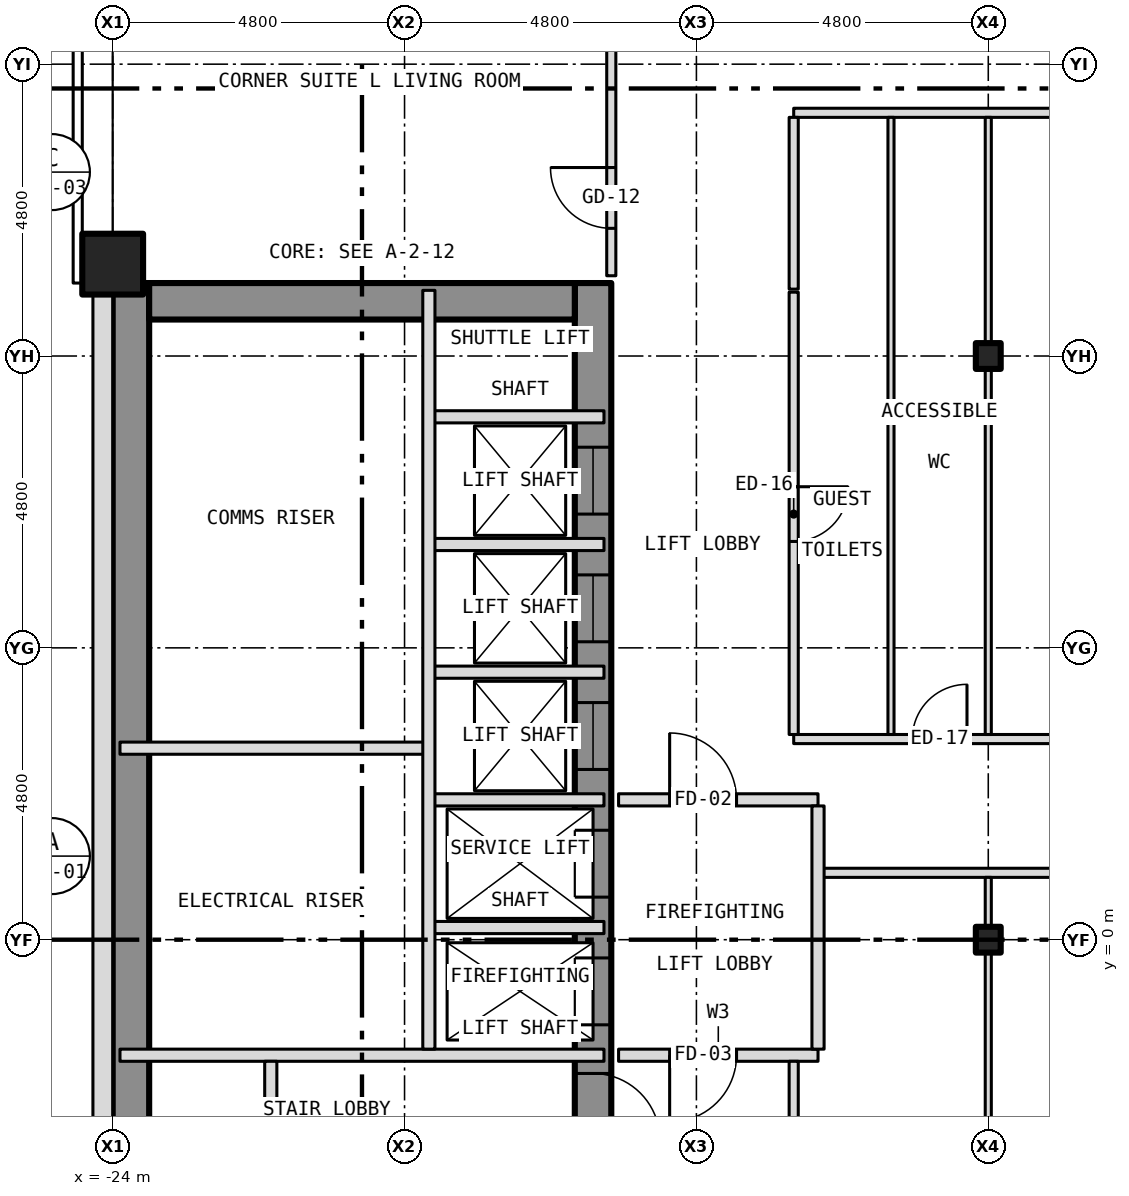
"""IFC4 building model, lengths in metres.
Left out: names, types, materials, properties, quantities, classifications, styles, units other than length and angle.
Written with IfcOpenShell. Run it as: python <this file> out.ifc"""

import sys

from ifc_helpers import new_model, si_unit, direction, frame, frame_2d, origin, origin_2d, place, context, subcontext, project, spatial, rectangle, hollow_rectangle, i_section, extrude, element, fill, save


model = new_model("IFC4")
c1 = context("Model", 3, precision=1e-05, world=origin(), true_north=direction((0.0, 1.0)))
c2 = subcontext(c1, "Body", "Model", "MODEL_VIEW")
j1 = project(units=[si_unit("LENGTHUNIT", "METRE"), si_unit("PLANEANGLEUNIT", "RADIAN")], contexts=[c1])
p1 = place(None, origin())
s1 = spatial("IfcSite", under=j1, at=p1, CompositionType="ELEMENT")
p2 = place(p1, origin())
s2 = spatial("IfcBuilding", under=s1, at=p2, CompositionType="ELEMENT")
p3 = place(p2, frame((0.0, 0.0, 46.0)))
s3 = spatial("IfcBuildingStorey", under=s2, at=p3, CompositionType="ELEMENT", Elevation=46.0)
p4 = place(p3, frame((-24.0, 11.111, -0.15), z_axis=(0.0, 0.0, 1.0), x_axis=(1.0, 0.0, 0.0)))
e1 = element("IfcColumn", 1, at=p4, inside=s3, PredefinedType="COLUMN", context=c2, shape_type="SweptSolid", body=[
    extrude(hollow_rectangle(XDim=1.0, YDim=1.0, WallThickness=0.06, at=origin_2d()), origin(), (0.0, 0.0, 1.0), 3.5),
])
for number, where, z_axis, x_axis in (
    (2, (-9.6, 0.0, -0.15), (0.0, 0.0, 1.0), (1.0, 0.0, 0.0)),
    (3, (-9.6, 9.6, -0.15), (0.0, 0.0, 1.0), (1.0, 0.0, 0.0)),
):
    element("IfcColumn", number, at=place(p3, frame(where, z_axis=z_axis, x_axis=x_axis)), inside=s3, PredefinedType="COLUMN", context=c2, shape_type="SweptSolid", body=[
        extrude(i_section(OverallWidth=0.409, OverallDepth=0.424, WebThickness=0.033, FlangeThickness=0.052, at=origin_2d()), origin(), (0.0, 0.0, 1.0), 3.5),
    ])
p5 = place(p3, frame((-16.1, -10.8, 0.0), z_axis=(0.0, 0.0, 1.0), x_axis=(0.0, 1.0, 0.0)))
e4 = element("IfcWall", 4, at=p5, inside=s3, PredefinedType="SHEAR", context=c2, shape_type="SweptSolid", body=[
    extrude(rectangle(XDim=21.6, YDim=0.6, at=frame_2d((10.8, 0.0))), origin(), (0.0, 0.0, 1.0), 3.25),
])
p6 = place(p5, frame((9.4, 0.0, 0.0)))
e5 = element("IfcOpeningElement", 5, at=p6, cuts=e4, PredefinedType="OPENING", context=c2, shape_type="SweptSolid", body=[
    extrude(rectangle(XDim=1.1, YDim=2.1, at=frame_2d((0.55, 1.05))), frame((0.0, 0.312, 0.0), z_axis=(0.0, -1.0, 0.0), x_axis=(1.0, 0.0, 0.0)), (0.0, 0.0, 1.0), 0.624),
])
p7 = place(p5, frame((11.5, 0.0, 0.0)))
e6 = element("IfcOpeningElement", 6, at=p7, cuts=e4, PredefinedType="OPENING", context=c2, shape_type="SweptSolid", body=[
    extrude(rectangle(XDim=1.1, YDim=2.1, at=frame_2d((0.55, 1.05))), frame((0.0, 0.312, 0.0), z_axis=(0.0, -1.0, 0.0), x_axis=(1.0, 0.0, 0.0)), (0.0, 0.0, 1.0), 0.624),
])
p8 = place(p5, frame((13.6, 0.0, 0.0)))
e7 = element("IfcOpeningElement", 7, at=p8, cuts=e4, PredefinedType="OPENING", context=c2, shape_type="SweptSolid", body=[
    extrude(rectangle(XDim=1.1, YDim=2.1, at=frame_2d((0.55, 1.05))), frame((0.0, 0.312, 0.0), z_axis=(0.0, -1.0, 0.0), x_axis=(1.0, 0.0, 0.0)), (0.0, 0.0, 1.0), 0.624),
])
p9 = place(p5, frame((15.7, 0.0, 0.0)))
e8 = element("IfcOpeningElement", 8, at=p9, cuts=e4, PredefinedType="OPENING", context=c2, shape_type="SweptSolid", body=[
    extrude(rectangle(XDim=1.1, YDim=2.1, at=frame_2d((0.55, 1.05))), frame((0.0, 0.312, 0.0), z_axis=(0.0, -1.0, 0.0), x_axis=(1.0, 0.0, 0.0)), (0.0, 0.0, 1.0), 0.624),
])
p10 = place(p5, frame((17.8, 0.0, 0.0)))
e9 = element("IfcOpeningElement", 9, at=p10, cuts=e4, PredefinedType="OPENING", context=c2, shape_type="SweptSolid", body=[
    extrude(rectangle(XDim=1.1, YDim=2.1, at=frame_2d((0.55, 1.05))), frame((0.0, 0.312, 0.0), z_axis=(0.0, -1.0, 0.0), x_axis=(1.0, 0.0, 0.0)), (0.0, 0.0, 1.0), 0.624),
])
p11 = place(p5, frame((0.758, 0.0, 0.0)))
e10 = element("IfcOpeningElement", 10, at=p11, cuts=e4, PredefinedType="OPENING", context=c2, shape_type="SweptSolid", body=[
    extrude(rectangle(XDim=1.1, YDim=2.1, at=frame_2d((0.55, 1.05))), frame((0.0, 0.312, 0.0), z_axis=(0.0, -1.0, 0.0), x_axis=(1.0, 0.0, 0.0)), (0.0, 0.0, 1.0), 0.624),
])
p12 = place(p5, frame((7.5, 0.0, 0.0)))
e11 = element("IfcOpeningElement", 11, at=p12, cuts=e4, PredefinedType="OPENING", context=c2, shape_type="SweptSolid", body=[
    extrude(rectangle(XDim=1.1, YDim=2.1, at=frame_2d((0.55, 1.05))), frame((0.0, 0.312, 0.0), z_axis=(0.0, -1.0, 0.0), x_axis=(1.0, 0.0, 0.0)), (0.0, 0.0, 1.0), 0.624),
])
p13 = place(p3, frame((-23.7, -10.8, 0.0), z_axis=(0.0, 0.0, 1.0), x_axis=(0.0, 1.0, 0.0)))
e12 = element("IfcWall", 12, at=p13, inside=s3, PredefinedType="SHEAR", context=c2, shape_type="SweptSolid", body=[
    extrude(rectangle(XDim=21.6, YDim=0.6, at=frame_2d((10.8, 0.0))), origin(), (0.0, 0.0, 1.0), 3.25),
])
p14 = place(p3, frame((-23.4, 10.5, 0.0), z_axis=(0.0, 0.0, 1.0), x_axis=(1.0, 0.0, 0.0)))
e13 = element("IfcWall", 13, at=p14, inside=s3, PredefinedType="SHEAR", context=c2, shape_type="SweptSolid", body=[
    extrude(rectangle(XDim=7.0, YDim=0.6, at=frame_2d((3.5, 0.0))), origin(), (0.0, 0.0, 1.0), 3.25),
])
p15 = place(p3, frame((-24.163, 10.8, 0.0), z_axis=(0.0, 0.0, 1.0), x_axis=(0.0, -1.0, 0.0)))
e14 = element("IfcWall", 14, at=p15, inside=s3, PredefinedType="SOLIDWALL", context=c2, shape_type="SweptSolid", body=[
    extrude(rectangle(XDim=21.6, YDim=0.325, at=frame_2d((10.8, 0.0))), origin(), (0.0, 0.0, 1.0), 3.5),
])
p16 = place(p15, frame((18.05, 0.0, 1.0)))
e15 = element("IfcOpeningElement", 15, at=p16, cuts=e14, PredefinedType="OPENING", context=c2, shape_type="SweptSolid", body=[
    extrude(rectangle(XDim=0.6, YDim=1.5, at=frame_2d((0.3, 0.75))), frame((0.0, 0.175, 0.0), z_axis=(0.0, -1.0, 0.0), x_axis=(1.0, 0.0, 0.0)), (0.0, 0.0, 1.0), 0.349),
])
p17 = place(p3, frame((-23.88, -1.9, 0.0), z_axis=(0.0, 0.0, 1.0), x_axis=(1.0, 0.0, 0.0)))
e16 = element("IfcWall", 16, at=p17, inside=s3, PredefinedType="PARTITIONING", context=c2, shape_type="SweptSolid", body=[
    extrude(rectangle(XDim=7.96, YDim=0.2, at=frame_2d((3.98, 0.0))), origin(), (0.0, 0.0, 1.0), 3.25),
])
p18 = place(p3, frame((-15.68, -1.9, 0.0), z_axis=(0.0, 0.0, 1.0), x_axis=(1.0, 0.0, 0.0)))
e17 = element("IfcWall", 17, at=p18, inside=s3, PredefinedType="PARTITIONING", context=c2, shape_type="SweptSolid", body=[
    extrude(rectangle(XDim=3.28, YDim=0.2, at=frame_2d((1.64, 0.0))), origin(), (0.0, 0.0, 1.0), 3.35),
])
p19 = place(p18, frame((0.84, 0.0, 0.0)))
e18 = element("IfcOpeningElement", 18, at=p19, cuts=e17, PredefinedType="OPENING", context=c2, shape_type="SweptSolid", body=[
    extrude(rectangle(XDim=1.1, YDim=2.1, at=frame_2d((0.55, 1.05))), frame((0.0, 0.112, 0.0), z_axis=(0.0, -1.0, 0.0), x_axis=(1.0, 0.0, 0.0)), (0.0, 0.0, 1.0), 0.224),
])
p20 = place(p3, frame((-18.8, 0.2, 0.0), z_axis=(0.0, 0.0, 1.0), x_axis=(1.0, 0.0, 0.0)))
e19 = element("IfcWall", 19, at=p20, inside=s3, PredefinedType="PARTITIONING", context=c2, shape_type="SweptSolid", body=[
    extrude(rectangle(XDim=2.88, YDim=0.2, at=frame_2d((1.44, 0.0))), origin(), (0.0, 0.0, 1.0), 3.25),
])
p21 = place(p3, frame((-12.4, 1.1, 0.0), z_axis=(0.0, 0.0, 1.0), x_axis=(1.0, 0.0, 0.0)))
e20 = element("IfcWall", 20, at=p21, inside=s3, PredefinedType="PARTITIONING", context=c2, shape_type="SweptSolid", body=[
    extrude(rectangle(XDim=24.8, YDim=0.15, at=frame_2d((12.4, 0.0))), origin(), (0.0, 0.0, 1.0), 3.35),
])
p22 = place(p3, frame((-18.8, 2.3, 0.0), z_axis=(0.0, 0.0, 1.0), x_axis=(1.0, 0.0, 0.0)))
e21 = element("IfcWall", 21, at=p22, inside=s3, PredefinedType="PARTITIONING", context=c2, shape_type="SweptSolid", body=[
    extrude(rectangle(XDim=2.88, YDim=0.2, at=frame_2d((1.44, 0.0))), origin(), (0.0, 0.0, 1.0), 3.25),
])
p23 = place(p3, frame((-15.68, 2.3, 0.0), z_axis=(0.0, 0.0, 1.0), x_axis=(1.0, 0.0, 0.0)))
e22 = element("IfcWall", 22, at=p23, inside=s3, PredefinedType="PARTITIONING", context=c2, shape_type="SweptSolid", body=[
    extrude(rectangle(XDim=3.28, YDim=0.2, at=frame_2d((1.64, 0.0))), origin(), (0.0, 0.0, 1.0), 3.35),
])
p24 = place(p23, frame((0.84, 0.0, 0.0)))
e23 = element("IfcOpeningElement", 23, at=p24, cuts=e22, PredefinedType="OPENING", context=c2, shape_type="SweptSolid", body=[
    extrude(rectangle(XDim=1.1, YDim=2.1, at=frame_2d((0.55, 1.05))), frame((0.0, 0.112, 0.0), z_axis=(0.0, -1.0, 0.0), x_axis=(1.0, 0.0, 0.0)), (0.0, 0.0, 1.0), 0.224),
])
p25 = place(p3, frame((-23.88, 3.15, 0.0), z_axis=(0.0, 0.0, 1.0), x_axis=(1.0, 0.0, 0.0)))
e24 = element("IfcWall", 24, at=p25, inside=s3, PredefinedType="PARTITIONING", context=c2, shape_type="SweptSolid", body=[
    extrude(rectangle(XDim=5.08, YDim=0.2, at=frame_2d((2.54, 0.0))), origin(), (0.0, 0.0, 1.0), 3.25),
])
p26 = place(p3, frame((-12.8, 3.3, 0.0), z_axis=(0.0, 0.0, 1.0), x_axis=(1.0, 0.0, 0.0)))
e25 = element("IfcWall", 25, at=p26, inside=s3, PredefinedType="PARTITIONING", context=c2, shape_type="SweptSolid", body=[
    extrude(rectangle(XDim=25.6, YDim=0.15, at=frame_2d((12.8, 0.0))), origin(), (0.0, 0.0, 1.0), 3.35),
])
p27 = place(p26, frame((1.95, 0.0, 0.0)))
e26 = element("IfcOpeningElement", 26, at=p27, cuts=e25, PredefinedType="OPENING", context=c2, shape_type="SweptSolid", body=[
    extrude(rectangle(XDim=0.9, YDim=2.1, at=frame_2d((0.45, 1.05))), frame((0.0, 0.087, 0.0), z_axis=(0.0, -1.0, 0.0), x_axis=(1.0, 0.0, 0.0)), (0.0, 0.0, 1.0), 0.174),
])
for number, where, z_axis, x_axis in (
    (27, (-18.8, 4.4, 0.0), (0.0, 0.0, 1.0), (1.0, 0.0, 0.0)),
    (28, (-18.8, 6.5, 0.0), (0.0, 0.0, 1.0), (1.0, 0.0, 0.0)),
    (29, (-18.8, 8.6, 0.0), (0.0, 0.0, 1.0), (1.0, 0.0, 0.0)),
):
    element("IfcWall", number, at=place(p3, frame(where, z_axis=z_axis, x_axis=x_axis)), inside=s3, PredefinedType="PARTITIONING", context=c2, shape_type="SweptSolid", body=[
        extrude(rectangle(XDim=2.88, YDim=0.2, at=frame_2d((1.44, 0.0))), origin(), (0.0, 0.0, 1.0), 3.25),
    ])
p28 = place(p3, frame((-12.8, 13.6, 0.0), z_axis=(0.0, 0.0, 1.0), x_axis=(1.0, 0.0, 0.0)))
e30 = element("IfcWall", 30, at=p28, inside=s3, PredefinedType="PARTITIONING", context=c2, shape_type="SweptSolid", body=[
    extrude(rectangle(XDim=25.6, YDim=0.15, at=frame_2d((12.8, 0.0))), origin(), (0.0, 0.0, 1.0), 3.35),
])
p29 = place(p28, frame((12.35, 0.0, 0.0)))
e31 = element("IfcOpeningElement", 31, at=p29, cuts=e30, PredefinedType="OPENING", context=c2, shape_type="SweptSolid", body=[
    extrude(rectangle(XDim=0.9, YDim=2.1, at=frame_2d((0.45, 1.05))), frame((0.0, 0.087, 0.0), z_axis=(0.0, -1.0, 0.0), x_axis=(1.0, 0.0, 0.0)), (0.0, 0.0, 1.0), 0.174),
])
p30 = place(p3, frame((-21.4, -10.68, 0.0), z_axis=(0.0, 0.0, 1.0), x_axis=(0.0, 1.0, 0.0)))
e32 = element("IfcWall", 32, at=p30, inside=s3, PredefinedType="PARTITIONING", context=c2, shape_type="SweptSolid", body=[
    extrude(rectangle(XDim=8.68, YDim=0.2, at=frame_2d((4.34, 0.0))), origin(), (0.0, 0.0, 1.0), 3.25),
])
p31 = place(p30, frame((0.899, 0.0, 0.0)))
e33 = element("IfcOpeningElement", 33, at=p31, cuts=e32, PredefinedType="OPENING", context=c2, shape_type="SweptSolid", body=[
    extrude(rectangle(XDim=0.9, YDim=2.1, at=frame_2d((0.45, 1.05))), frame((0.0, 0.112, 0.0), z_axis=(0.0, -1.0, 0.0), x_axis=(1.0, 0.0, 0.0)), (0.0, 0.0, 1.0), 0.224),
])
p32 = place(p30, frame((5.349, 0.0, 0.0)))
e34 = element("IfcOpeningElement", 34, at=p32, cuts=e32, PredefinedType="OPENING", context=c2, shape_type="SweptSolid", body=[
    extrude(rectangle(XDim=0.9, YDim=2.1, at=frame_2d((0.45, 1.05))), frame((0.0, 0.112, 0.0), z_axis=(0.0, -1.0, 0.0), x_axis=(1.0, 0.0, 0.0)), (0.0, 0.0, 1.0), 0.224),
])
p33 = place(p3, frame((-18.8, -1.8, 0.0), z_axis=(0.0, 0.0, 1.0), x_axis=(0.0, 1.0, 0.0)))
e35 = element("IfcWall", 35, at=p33, inside=s3, PredefinedType="PARTITIONING", context=c2, shape_type="SweptSolid", body=[
    extrude(rectangle(XDim=12.48, YDim=0.2, at=frame_2d((6.24, 0.0))), origin(), (0.0, 0.0, 1.0), 3.25),
])
p34 = place(p3, frame((-15.8, 10.92, 0.0), z_axis=(0.0, 0.0, 1.0), x_axis=(0.0, 1.0, 0.0)))
e36 = element("IfcWall", 36, at=p34, inside=s3, PredefinedType="PARTITIONING", context=c2, shape_type="SweptSolid", body=[
    extrude(rectangle(XDim=4.805, YDim=0.15, at=frame_2d((2.403, 0.0))), origin(), (0.0, 0.0, 1.0), 3.35),
])
p35 = place(p34, frame((0.78, 0.0, 0.0)))
e37 = element("IfcOpeningElement", 37, at=p35, cuts=e36, PredefinedType="OPENING", context=c2, shape_type="SweptSolid", body=[
    extrude(rectangle(XDim=1.0, YDim=2.1, at=frame_2d((0.5, 1.05))), frame((0.0, 0.087, 0.0), z_axis=(0.0, -1.0, 0.0), x_axis=(1.0, 0.0, 0.0)), (0.0, 0.0, 1.0), 0.174),
])
p36 = place(p3, frame((-12.8, -13.525, 0.0), z_axis=(0.0, 0.0, 1.0), x_axis=(0.0, 1.0, 0.0)))
e38 = element("IfcWall", 38, at=p36, inside=s3, PredefinedType="PARTITIONING", context=c2, shape_type="SweptSolid", body=[
    extrude(rectangle(XDim=11.525, YDim=0.15, at=frame_2d((5.762, 0.0))), origin(), (0.0, 0.0, 1.0), 3.35),
])
p37 = place(p36, frame((6.725, 0.0, 0.0)))
e39 = element("IfcOpeningElement", 39, at=p37, cuts=e38, PredefinedType="OPENING", context=c2, shape_type="SweptSolid", body=[
    extrude(rectangle(XDim=0.9, YDim=2.1, at=frame_2d((0.45, 1.05))), frame((0.0, 0.087, 0.0), z_axis=(0.0, -1.0, 0.0), x_axis=(1.0, 0.0, 0.0)), (0.0, 0.0, 1.0), 0.174),
])
p38 = place(p3, frame((-12.8, 3.375, 0.0), z_axis=(0.0, 0.0, 1.0), x_axis=(0.0, 1.0, 0.0)))
e40 = element("IfcWall", 40, at=p38, inside=s3, PredefinedType="PARTITIONING", context=c2, shape_type="SweptSolid", body=[
    extrude(rectangle(XDim=7.275, YDim=0.15, at=frame_2d((3.637, 0.0))), origin(), (0.0, 0.0, 1.0), 3.35),
])
p39 = place(p38, frame((3.175, 0.0, 0.0)))
e41 = element("IfcOpeningElement", 41, at=p39, cuts=e40, PredefinedType="OPENING", context=c2, shape_type="SweptSolid", body=[
    extrude(rectangle(XDim=0.9, YDim=2.1, at=frame_2d((0.45, 1.05))), frame((0.0, 0.087, 0.0), z_axis=(0.0, -1.0, 0.0), x_axis=(1.0, 0.0, 0.0)), (0.0, 0.0, 1.0), 0.174),
])
p40 = place(p3, frame((-12.8, 10.7, 0.0), z_axis=(0.0, 0.0, 1.0), x_axis=(0.0, 1.0, 0.0)))
e42 = element("IfcWall", 42, at=p40, inside=s3, PredefinedType="PARTITIONING", context=c2, shape_type="SweptSolid", body=[
    extrude(rectangle(XDim=2.825, YDim=0.15, at=frame_2d((1.413, 0.0))), origin(), (0.0, 0.0, 1.0), 3.35),
])
p41 = place(p3, frame((-12.4, -1.8, 0.0), z_axis=(0.0, 0.0, 1.0), x_axis=(0.0, 1.0, 0.0)))
e43 = element("IfcWall", 43, at=p41, inside=s3, PredefinedType="PARTITIONING", context=c2, shape_type="SweptSolid", body=[
    extrude(rectangle(XDim=4.0, YDim=0.2, at=frame_2d((2.0, 0.0))), origin(), (0.0, 0.0, 1.0), 3.35),
])
p42 = place(p3, frame((-11.2, 3.375, 0.0), z_axis=(0.0, 0.0, 1.0), x_axis=(0.0, 1.0, 0.0)))
e44 = element("IfcWall", 44, at=p42, inside=s3, PredefinedType="PARTITIONING", context=c2, shape_type="SweptSolid", body=[
    extrude(rectangle(XDim=10.15, YDim=0.1, at=frame_2d((5.075, 0.0))), origin(), (0.0, 0.0, 1.0), 3.35),
])
p43 = place(p3, frame((-9.6, -9.396, 0.0), z_axis=(0.0, 0.0, 1.0), x_axis=(0.0, 1.0, 0.0)))
e45 = element("IfcWall", 45, at=p43, inside=s3, PredefinedType="PARTITIONING", context=c2, shape_type="SweptSolid", body=[
    extrude(rectangle(XDim=9.192, YDim=0.1, at=frame_2d((4.596, 0.0))), origin(), (0.0, 0.0, 1.0), 2.728),
])
p44 = place(p3, frame((-9.6, -0.204, 0.0), z_axis=(0.0, 0.0, 1.0), x_axis=(0.0, 1.0, 0.0)))
e46 = element("IfcWall", 46, at=p44, inside=s3, PredefinedType="PARTITIONING", context=c2, shape_type="SweptSolid", body=[
    extrude(rectangle(XDim=0.408, YDim=0.1, at=frame_2d((0.204, 0.0))), origin(), (0.0, 0.0, 1.0), 3.35),
])
p45 = place(p3, frame((-9.6, 0.204, 0.0), z_axis=(0.0, 0.0, 1.0), x_axis=(0.0, 1.0, 0.0)))
e47 = element("IfcWall", 47, at=p45, inside=s3, PredefinedType="PARTITIONING", context=c2, shape_type="SweptSolid", body=[
    extrude(rectangle(XDim=0.821, YDim=0.1, at=frame_2d((0.41, 0.0))), origin(), (0.0, 0.0, 1.0), 2.728),
])
p46 = place(p3, frame((-9.6, 3.375, 0.0), z_axis=(0.0, 0.0, 1.0), x_axis=(0.0, 1.0, 0.0)))
e48 = element("IfcWall", 48, at=p46, inside=s3, PredefinedType="PARTITIONING", context=c2, shape_type="SweptSolid", body=[
    extrude(rectangle(XDim=6.021, YDim=0.1, at=frame_2d((3.01, 0.0))), origin(), (0.0, 0.0, 1.0), 2.728),
])
p47 = place(p3, frame((-9.6, 9.396, 0.0), z_axis=(0.0, 0.0, 1.0), x_axis=(0.0, 1.0, 0.0)))
e49 = element("IfcWall", 49, at=p47, inside=s3, PredefinedType="PARTITIONING", context=c2, shape_type="SweptSolid", body=[
    extrude(rectangle(XDim=0.408, YDim=0.1, at=frame_2d((0.204, 0.0))), origin(), (0.0, 0.0, 1.0), 3.35),
])
p48 = place(p3, frame((-9.6, 9.804, 0.0), z_axis=(0.0, 0.0, 1.0), x_axis=(0.0, 1.0, 0.0)))
e50 = element("IfcWall", 50, at=p48, inside=s3, PredefinedType="PARTITIONING", context=c2, shape_type="SweptSolid", body=[
    extrude(rectangle(XDim=3.721, YDim=0.1, at=frame_2d((1.86, 0.0))), origin(), (0.0, 0.0, 1.0), 2.728),
])
p49 = place(p6, origin())
e51 = element("IfcDoor", 51, at=p49, inside=s3, OperationType="SLIDING_TO_LEFT", PredefinedType="DOOR", context=c2, shape_type="SweptSolid", body=[
    extrude(rectangle(XDim=1.1, YDim=2.1, at=frame_2d((0.55, 1.05))), frame((0.0, 0.025, 0.0), z_axis=(0.0, -1.0, 0.0), x_axis=(1.0, 0.0, 0.0)), (0.0, 0.0, 1.0), 0.05),
])
fill(e5, e51)
p50 = place(p7, origin())
e52 = element("IfcDoor", 52, at=p50, inside=s3, OperationType="SLIDING_TO_LEFT", PredefinedType="DOOR", context=c2, shape_type="SweptSolid", body=[
    extrude(rectangle(XDim=1.1, YDim=2.1, at=frame_2d((0.55, 1.05))), frame((0.0, 0.025, 0.0), z_axis=(0.0, -1.0, 0.0), x_axis=(1.0, 0.0, 0.0)), (0.0, 0.0, 1.0), 0.05),
])
fill(e6, e52)
p51 = place(p8, origin())
e53 = element("IfcDoor", 53, at=p51, inside=s3, OperationType="SLIDING_TO_LEFT", PredefinedType="DOOR", context=c2, shape_type="SweptSolid", body=[
    extrude(rectangle(XDim=1.1, YDim=2.1, at=frame_2d((0.55, 1.05))), frame((0.0, 0.025, 0.0), z_axis=(0.0, -1.0, 0.0), x_axis=(1.0, 0.0, 0.0)), (0.0, 0.0, 1.0), 0.05),
])
fill(e7, e53)
p52 = place(p9, origin())
e54 = element("IfcDoor", 54, at=p52, inside=s3, OperationType="SLIDING_TO_LEFT", PredefinedType="DOOR", context=c2, shape_type="SweptSolid", body=[
    extrude(rectangle(XDim=1.1, YDim=2.1, at=frame_2d((0.55, 1.05))), frame((0.0, 0.025, 0.0), z_axis=(0.0, -1.0, 0.0), x_axis=(1.0, 0.0, 0.0)), (0.0, 0.0, 1.0), 0.05),
])
fill(e8, e54)
p53 = place(p10, origin())
e55 = element("IfcDoor", 55, at=p53, inside=s3, OperationType="SLIDING_TO_LEFT", PredefinedType="DOOR", context=c2, shape_type="SweptSolid", body=[
    extrude(rectangle(XDim=1.1, YDim=2.1, at=frame_2d((0.55, 1.05))), frame((0.0, 0.025, 0.0), z_axis=(0.0, -1.0, 0.0), x_axis=(1.0, 0.0, 0.0)), (0.0, 0.0, 1.0), 0.05),
])
fill(e9, e55)
p54 = place(p12, origin())
e56 = element("IfcDoor", 56, at=p54, inside=s3, OperationType="SINGLE_SWING_LEFT", PredefinedType="DOOR", context=c2, shape_type="SweptSolid", body=[
    extrude(rectangle(XDim=1.1, YDim=2.1, at=frame_2d((0.55, 1.05))), frame((0.0, 0.025, 0.0), z_axis=(0.0, -1.0, 0.0), x_axis=(1.0, 0.0, 0.0)), (0.0, 0.0, 1.0), 0.05),
])
fill(e11, e56)
p55 = place(p24, origin())
e57 = element("IfcDoor", 57, at=p55, inside=s3, OperationType="SINGLE_SWING_LEFT", PredefinedType="DOOR", context=c2, shape_type="SweptSolid", body=[
    extrude(rectangle(XDim=1.1, YDim=2.1, at=frame_2d((0.55, 1.05))), frame((0.0, 0.025, 0.0), z_axis=(0.0, -1.0, 0.0), x_axis=(1.0, 0.0, 0.0)), (0.0, 0.0, 1.0), 0.05),
])
fill(e23, e57)
p56 = place(p19, origin())
e58 = element("IfcDoor", 58, at=p56, inside=s3, OperationType="SINGLE_SWING_LEFT", PredefinedType="DOOR", context=c2, shape_type="SweptSolid", body=[
    extrude(rectangle(XDim=1.1, YDim=2.1, at=frame_2d((0.55, 1.05))), frame((0.0, 0.025, 0.0), z_axis=(0.0, -1.0, 0.0), x_axis=(1.0, 0.0, 0.0)), (0.0, 0.0, 1.0), 0.05),
])
fill(e18, e58)
p57 = place(p35, origin())
e59 = element("IfcDoor", 59, at=p57, inside=s3, OperationType="SINGLE_SWING_RIGHT", PredefinedType="DOOR", context=c2, shape_type="SweptSolid", body=[
    extrude(rectangle(XDim=1.0, YDim=2.1, at=frame_2d((0.5, 1.05))), frame((0.0, 0.025, 0.0), z_axis=(0.0, -1.0, 0.0), x_axis=(1.0, 0.0, 0.0)), (0.0, 0.0, 1.0), 0.05),
])
fill(e37, e59)
p58 = place(p39, origin())
e60 = element("IfcDoor", 60, at=p58, inside=s3, OperationType="SINGLE_SWING_RIGHT", PredefinedType="DOOR", context=c2, shape_type="SweptSolid", body=[
    extrude(rectangle(XDim=0.9, YDim=2.1, at=frame_2d((0.45, 1.05))), frame((0.0, 0.025, 0.0), z_axis=(0.0, -1.0, 0.0), x_axis=(1.0, 0.0, 0.0)), (0.0, 0.0, 1.0), 0.05),
])
fill(e41, e60)
p59 = place(p27, origin())
e61 = element("IfcDoor", 61, at=p59, inside=s3, OperationType="SINGLE_SWING_RIGHT", PredefinedType="DOOR", context=c2, shape_type="SweptSolid", body=[
    extrude(rectangle(XDim=0.9, YDim=2.1, at=frame_2d((0.45, 1.05))), frame((0.0, 0.025, 0.0), z_axis=(0.0, -1.0, 0.0), x_axis=(1.0, 0.0, 0.0)), (0.0, 0.0, 1.0), 0.05),
])
fill(e26, e61)
save(model, sys.argv[1])
